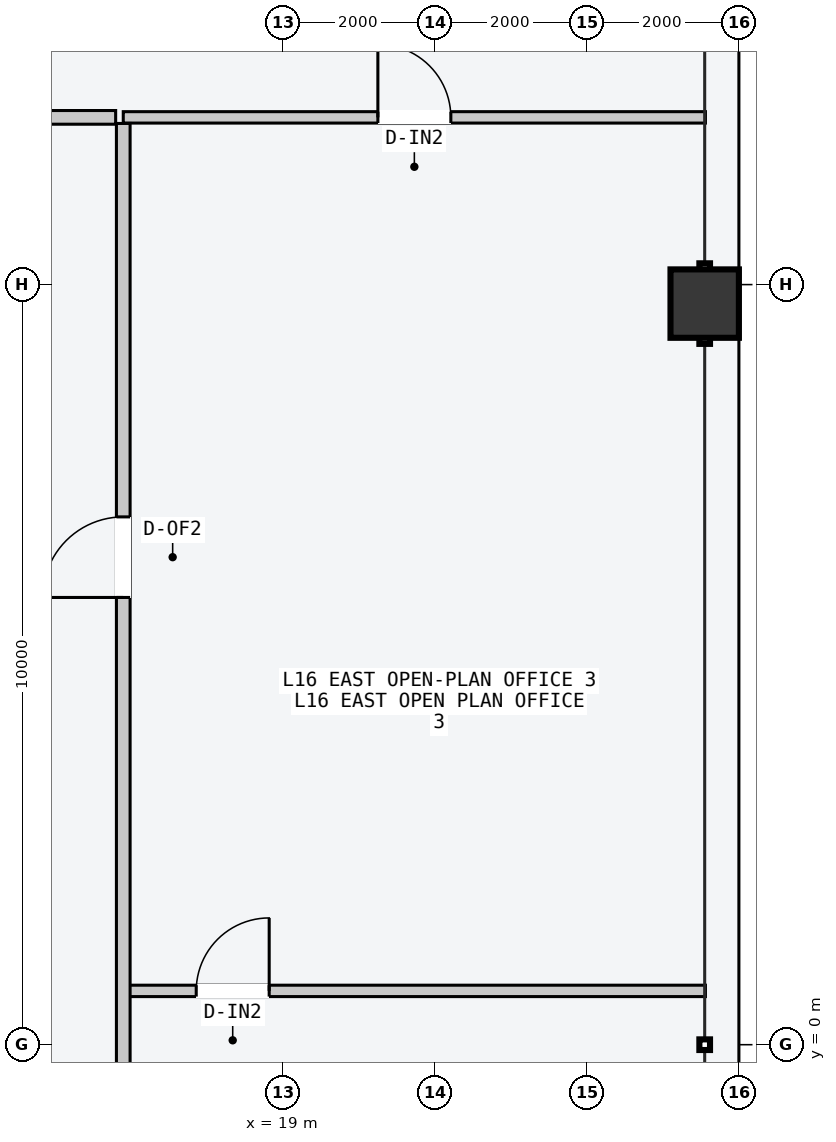
"""IFC4 building model, lengths in metres.
Left out: names, types, materials, properties, quantities, classifications, styles, units other than length and angle.
Written with IfcOpenShell. Run it as: python <this file> out.ifc"""

import sys

from ifc_helpers import new_model, si_unit, direction, frame, frame_2d, origin, origin_2d, place, context, subcontext, project, spatial, rectangle, hollow_rectangle, extrude, element, fill, save


model = new_model("IFC4")
c1 = context("Model", 3, precision=1e-05, world=origin(), true_north=direction((0.0, 1.0)))
c2 = subcontext(c1, "Body", "Model", "MODEL_VIEW")
j1 = project(units=[si_unit("LENGTHUNIT", "METRE"), si_unit("PLANEANGLEUNIT", "RADIAN")], contexts=[c1])
p1 = place(None, origin())
s1 = spatial("IfcSite", under=j1, at=p1, CompositionType="ELEMENT")
p2 = place(p1, origin())
s2 = spatial("IfcBuilding", under=s1, at=p2, CompositionType="ELEMENT")
p3 = place(p2, frame((0.0, 0.0, 63.6)))
s3 = spatial("IfcBuildingStorey", under=s2, at=p3, CompositionType="ELEMENT", Elevation=63.6)
p4 = place(p3, frame((24.55, 9.75, 0.0), z_axis=(0.0, 0.0, 1.0), x_axis=(0.0, 1.0, 0.0)))
e1 = element("IfcColumn", 1, at=p4, inside=s3, PredefinedType="COLUMN", context=c2, shape_type="SweptSolid", body=[
    extrude(hollow_rectangle(XDim=0.9, YDim=0.9, WallThickness=0.045, at=origin_2d()), origin(), (0.0, 0.0, 1.0), 3.6),
])
p5 = place(p3, frame((-16.8, 12.2, 0.0), z_axis=(0.0, 0.0, 1.0), x_axis=(1.0, 0.0, 0.0)))
e2 = element("IfcWall", 2, at=p5, inside=s3, PredefinedType="PARTITIONING", context=c2, shape_type="SweptSolid", body=[
    extrude(rectangle(XDim=33.6, YDim=0.18, at=frame_2d((16.8, 0.0))), origin(), (0.0, 0.0, 1.0), 3.4),
])
p6 = place(p5, frame((16.35, 0.0, 0.0)))
e3 = element("IfcOpeningElement", 3, at=p6, cuts=e2, PredefinedType="OPENING", context=c2, shape_type="SweptSolid", body=[
    extrude(rectangle(XDim=0.9, YDim=2.15, at=frame_2d((0.45, 1.075))), frame((0.0, 0.1, 0.0), z_axis=(0.0, -1.0, 0.0), x_axis=(1.0, 0.0, 0.0)), (0.0, 0.0, 1.0), 0.2),
])
p7 = place(p3, frame((16.9, 12.2, 0.0), z_axis=(0.0, 0.0, 1.0), x_axis=(1.0, 0.0, 0.0)))
e4 = element("IfcWall", 4, at=p7, inside=s3, PredefinedType="PARTITIONING", context=c2, shape_type="SweptSolid", body=[
    extrude(rectangle(XDim=7.66, YDim=0.15, at=frame_2d((3.83, 0.0))), origin(), (0.0, 0.0, 1.0), 3.4),
])
p8 = place(p7, frame((3.35, 0.0, 0.0)))
e5 = element("IfcOpeningElement", 5, at=p8, cuts=e4, PredefinedType="OPENING", context=c2, shape_type="SweptSolid", body=[
    extrude(rectangle(XDim=0.96, YDim=2.18, at=frame_2d((0.48, 1.09))), frame((0.0, 0.085, 0.0), z_axis=(0.0, -1.0, 0.0), x_axis=(1.0, 0.0, 0.0)), (0.0, 0.0, 1.0), 0.17),
])
p9 = place(p3, frame((16.96, 0.708, 0.0), z_axis=(0.0, 0.0, 1.0), x_axis=(1.0, 0.0, 0.0)))
e6 = element("IfcWall", 6, at=p9, inside=s3, PredefinedType="PARTITIONING", context=c2, shape_type="SweptSolid", body=[
    extrude(rectangle(XDim=7.6, YDim=0.15, at=frame_2d((3.8, 0.0))), origin(), (0.0, 0.0, 1.0), 3.4),
])
p10 = place(p9, frame((0.9, 0.0, 0.0)))
e7 = element("IfcOpeningElement", 7, at=p10, cuts=e6, PredefinedType="OPENING", context=c2, shape_type="SweptSolid", body=[
    extrude(rectangle(XDim=0.96, YDim=2.18, at=frame_2d((0.48, 1.09))), frame((0.0, 0.085, 0.0), z_axis=(0.0, -1.0, 0.0), x_axis=(1.0, 0.0, 0.0)), (0.0, 0.0, 1.0), 0.17),
])
p11 = place(p3, frame((16.9, -14.42, 0.0), z_axis=(0.0, 0.0, 1.0), x_axis=(0.0, 1.0, 0.0)))
e8 = element("IfcWall", 8, at=p11, inside=s3, PredefinedType="PARTITIONING", context=c2, shape_type="SweptSolid", body=[
    extrude(rectangle(XDim=26.54, YDim=0.18, at=frame_2d((13.27, 0.0))), origin(), (0.0, 0.0, 1.0), 3.4),
])
p12 = place(p11, frame((2.572, 0.0, 0.0)))
e9 = element("IfcOpeningElement", 9, at=p12, cuts=e8, PredefinedType="OPENING", context=c2, shape_type="SweptSolid", body=[
    extrude(rectangle(XDim=0.96, YDim=2.18, at=frame_2d((0.48, 1.09))), frame((0.0, 0.1, 0.0), z_axis=(0.0, -1.0, 0.0), x_axis=(1.0, 0.0, 0.0)), (0.0, 0.0, 1.0), 0.2),
])
p13 = place(p11, frame((10.106, 0.0, 0.0)))
e10 = element("IfcOpeningElement", 10, at=p13, cuts=e8, PredefinedType="OPENING", context=c2, shape_type="SweptSolid", body=[
    extrude(rectangle(XDim=1.02, YDim=2.2, at=frame_2d((0.51, 1.1))), frame((0.0, 0.1, 0.0), z_axis=(0.0, -1.0, 0.0), x_axis=(1.0, 0.0, 0.0)), (0.0, 0.0, 1.0), 0.2),
])
p14 = place(p11, frame((20.304, 0.0, 0.0)))
e11 = element("IfcOpeningElement", 11, at=p14, cuts=e8, PredefinedType="OPENING", context=c2, shape_type="SweptSolid", body=[
    extrude(rectangle(XDim=1.06, YDim=2.2, at=frame_2d((0.53, 1.1))), frame((0.0, 0.1, 0.0), z_axis=(0.0, -1.0, 0.0), x_axis=(1.0, 0.0, 0.0)), (0.0, 0.0, 1.0), 0.2),
])
p15 = place(p8, origin())
e12 = element("IfcDoor", 12, at=p15, inside=s3, OperationType="SINGLE_SWING_LEFT", PredefinedType="DOOR", context=c2, shape_type="SweptSolid", body=[
    extrude(rectangle(XDim=0.96, YDim=2.18, at=frame_2d((0.48, 1.09))), frame((0.0, 0.025, 0.0), z_axis=(0.0, -1.0, 0.0), x_axis=(1.0, 0.0, 0.0)), (0.0, 0.0, 1.0), 0.05),
])
fill(e5, e12)
p16 = place(p10, origin())
e13 = element("IfcDoor", 13, at=p16, inside=s3, OperationType="SINGLE_SWING_RIGHT", PredefinedType="DOOR", context=c2, shape_type="SweptSolid", body=[
    extrude(rectangle(XDim=0.96, YDim=2.18, at=frame_2d((0.48, 1.09))), frame((0.0, 0.025, 0.0), z_axis=(0.0, -1.0, 0.0), x_axis=(1.0, 0.0, 0.0)), (0.0, 0.0, 1.0), 0.05),
])
fill(e7, e13)
p17 = place(p14, origin())
e14 = element("IfcDoor", 14, at=p17, inside=s3, OperationType="SINGLE_SWING_LEFT", PredefinedType="DOOR", context=c2, shape_type="SweptSolid", body=[
    extrude(rectangle(XDim=1.06, YDim=2.2, at=frame_2d((0.53, 1.1))), frame((0.0, 0.025, 0.0), z_axis=(0.0, -1.0, 0.0), x_axis=(1.0, 0.0, 0.0)), (0.0, 0.0, 1.0), 0.05),
])
fill(e11, e14)
save(model, sys.argv[1])
